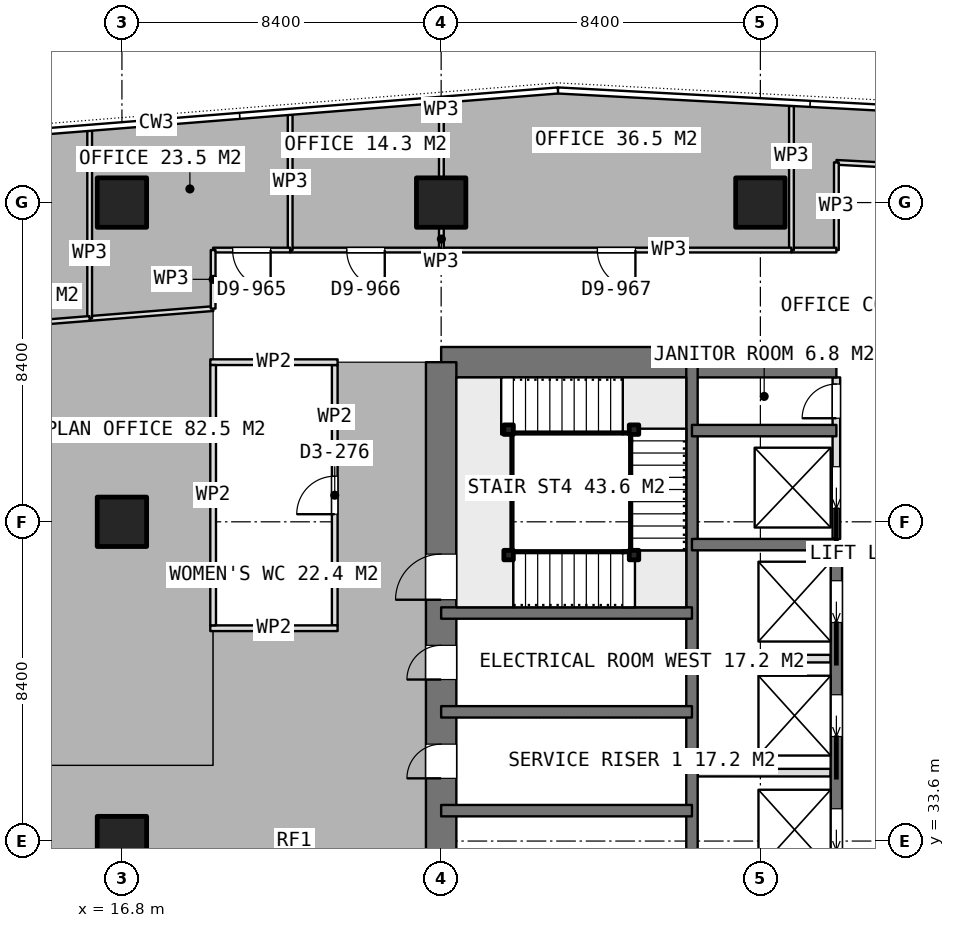
"""IFC4 building model, lengths in metres.
Left out: names, types, materials, properties, quantities, classifications, styles, units other than length and angle.
Written with IfcOpenShell. Run it as: python <this file> out.ifc"""

import sys

from ifc_helpers import new_model, si_unit, direction, frame, frame_2d, origin, origin_2d, place, context, subcontext, project, spatial, rectangle, extrude, element, fill, save


model = new_model("IFC4")
c1 = context("Model", 3, precision=1e-05, world=origin(), true_north=direction((0.0, 1.0)))
c2 = subcontext(c1, "Body", "Model", "MODEL_VIEW")
j1 = project(units=[si_unit("LENGTHUNIT", "METRE"), si_unit("PLANEANGLEUNIT", "RADIAN")], contexts=[c1])
p1 = place(None, origin())
s1 = spatial("IfcSite", under=j1, at=p1, CompositionType="ELEMENT")
p2 = place(p1, origin())
s2 = spatial("IfcBuilding", under=s1, at=p2, CompositionType="ELEMENT")
p3 = place(p2, frame((0.0, 0.0, 257.6)))
s3 = spatial("IfcBuildingStorey", under=s2, at=p3, CompositionType="ELEMENT", Elevation=257.6)
p4 = place(p3, frame((25.2, 46.2, 0.0), z_axis=(0.0, 0.0, 1.0), x_axis=(1.0, 0.0, 0.0)))
e1 = element("IfcWall", 1, at=p4, inside=s3, PredefinedType="SHEAR", context=c2, shape_type="SweptSolid", body=[
    extrude(rectangle(XDim=10.4, YDim=0.8, at=frame_2d((5.2, 0.0))), origin(), (0.0, 0.0, 1.0), 3.75),
])
p5 = place(p3, frame((25.2, 21.0, 0.0), z_axis=(0.0, 0.0, 1.0), x_axis=(0.0, 1.0, 0.0)))
e2 = element("IfcWall", 2, at=p5, inside=s3, PredefinedType="SHEAR", context=c2, shape_type="SweptSolid", body=[
    extrude(rectangle(XDim=25.2, YDim=0.8, at=frame_2d((12.6, 0.0))), origin(), (0.0, 0.0, 1.0), 3.75),
])
p6 = place(p5, frame((7.8, 0.0, 0.0)))
e3 = element("IfcOpeningElement", 3, at=p6, cuts=e2, PredefinedType="OPENING", context=c2, shape_type="SweptSolid", body=[
    extrude(rectangle(XDim=1.2, YDim=2.1, at=frame_2d((0.6, 1.05))), frame((0.0, 0.41, 0.0), z_axis=(0.0, -1.0, 0.0), x_axis=(1.0, 0.0, 0.0)), (0.0, 0.0, 1.0), 0.82),
])
p7 = place(p5, frame((14.25, 0.0, 0.0)))
e4 = element("IfcOpeningElement", 4, at=p7, cuts=e2, PredefinedType="OPENING", context=c2, shape_type="SweptSolid", body=[
    extrude(rectangle(XDim=0.9, YDim=2.1, at=frame_2d((0.45, 1.05))), frame((0.0, 0.41, 0.0), z_axis=(0.0, -1.0, 0.0), x_axis=(1.0, 0.0, 0.0)), (0.0, 0.0, 1.0), 0.82),
])
p8 = place(p5, frame((16.85, 0.0, 0.0)))
e5 = element("IfcOpeningElement", 5, at=p8, cuts=e2, PredefinedType="OPENING", context=c2, shape_type="SweptSolid", body=[
    extrude(rectangle(XDim=0.9, YDim=2.1, at=frame_2d((0.45, 1.05))), frame((0.0, 0.41, 0.0), z_axis=(0.0, -1.0, 0.0), x_axis=(1.0, 0.0, 0.0)), (0.0, 0.0, 1.0), 0.82),
])
p9 = place(p5, frame((18.95, 0.0, 0.0)))
e6 = element("IfcOpeningElement", 6, at=p9, cuts=e2, PredefinedType="OPENING", context=c2, shape_type="SweptSolid", body=[
    extrude(rectangle(XDim=1.2, YDim=2.1, at=frame_2d((0.6, 1.05))), frame((0.0, 0.41, 0.0), z_axis=(0.0, -1.0, 0.0), x_axis=(1.0, 0.0, 0.0)), (0.0, 0.0, 1.0), 0.82),
])
p10 = place(p3, frame((31.8, 21.0, 0.0), z_axis=(0.0, 0.0, 1.0), x_axis=(0.0, 1.0, 0.0)))
e7 = element("IfcWall", 7, at=p10, inside=s3, PredefinedType="SHEAR", context=c2, shape_type="SweptSolid", body=[
    extrude(rectangle(XDim=25.2, YDim=0.3, at=frame_2d((12.6, 0.0))), origin(), (0.0, 0.0, 1.0), 3.75),
])
p11 = place(p3, frame((35.6, 23.4, 0.0), z_axis=(0.0, 0.0, 1.0), x_axis=(0.0, 1.0, 0.0)))
e8 = element("IfcWall", 8, at=p11, inside=s3, PredefinedType="SHEAR", context=c2, shape_type="SweptSolid", body=[
    extrude(rectangle(XDim=18.0, YDim=0.3, at=frame_2d((9.0, 0.0))), origin(), (0.0, 0.0, 1.0), 3.75),
])
p12 = place(p11, frame((0.95, 0.0, 0.0)))
e9 = element("IfcOpeningElement", 9, at=p12, cuts=e8, PredefinedType="OPENING", context=c2, shape_type="SweptSolid", body=[
    extrude(rectangle(XDim=1.1, YDim=2.1, at=frame_2d((0.55, 1.05))), frame((0.0, 0.16, 0.0), z_axis=(0.0, -1.0, 0.0), x_axis=(1.0, 0.0, 0.0)), (0.0, 0.0, 1.0), 0.32),
])
p13 = place(p11, frame((3.95, 0.0, 0.0)))
e10 = element("IfcOpeningElement", 10, at=p13, cuts=e8, PredefinedType="OPENING", context=c2, shape_type="SweptSolid", body=[
    extrude(rectangle(XDim=1.1, YDim=2.1, at=frame_2d((0.55, 1.05))), frame((0.0, 0.16, 0.0), z_axis=(0.0, -1.0, 0.0), x_axis=(1.0, 0.0, 0.0)), (0.0, 0.0, 1.0), 0.32),
])
p14 = place(p11, frame((6.95, 0.0, 0.0)))
e11 = element("IfcOpeningElement", 11, at=p14, cuts=e8, PredefinedType="OPENING", context=c2, shape_type="SweptSolid", body=[
    extrude(rectangle(XDim=1.1, YDim=2.1, at=frame_2d((0.55, 1.05))), frame((0.0, 0.16, 0.0), z_axis=(0.0, -1.0, 0.0), x_axis=(1.0, 0.0, 0.0)), (0.0, 0.0, 1.0), 0.32),
])
p15 = place(p11, frame((9.95, 0.0, 0.0)))
e12 = element("IfcOpeningElement", 12, at=p15, cuts=e8, PredefinedType="OPENING", context=c2, shape_type="SweptSolid", body=[
    extrude(rectangle(XDim=1.1, YDim=2.1, at=frame_2d((0.55, 1.05))), frame((0.0, 0.16, 0.0), z_axis=(0.0, -1.0, 0.0), x_axis=(1.0, 0.0, 0.0)), (0.0, 0.0, 1.0), 0.32),
])
p16 = place(p11, frame((12.95, 0.0, 0.0)))
e13 = element("IfcOpeningElement", 13, at=p16, cuts=e8, PredefinedType="OPENING", context=c2, shape_type="SweptSolid", body=[
    extrude(rectangle(XDim=1.1, YDim=2.1, at=frame_2d((0.55, 1.05))), frame((0.0, 0.16, 0.0), z_axis=(0.0, -1.0, 0.0), x_axis=(1.0, 0.0, 0.0)), (0.0, 0.0, 1.0), 0.32),
])
p17 = place(p11, frame((15.95, 0.0, 0.0)))
e14 = element("IfcOpeningElement", 14, at=p17, cuts=e8, PredefinedType="OPENING", context=c2, shape_type="SweptSolid", body=[
    extrude(rectangle(XDim=1.1, YDim=2.1, at=frame_2d((0.55, 1.05))), frame((0.0, 0.16, 0.0), z_axis=(0.0, -1.0, 0.0), x_axis=(1.0, 0.0, 0.0)), (0.0, 0.0, 1.0), 0.32),
])
for number, where, z_axis, x_axis in (
    (15, (31.8, 41.4, 0.0), (0.0, 0.0, 1.0), (1.0, 0.0, 0.0)),
    (16, (31.8, 44.4, 0.0), (0.0, 0.0, 1.0), (1.0, 0.0, 0.0)),
):
    element("IfcWall", number, at=place(p3, frame(where, z_axis=z_axis, x_axis=x_axis)), inside=s3, PredefinedType="SHEAR", context=c2, shape_type="SweptSolid", body=[
        extrude(rectangle(XDim=3.8, YDim=0.3, at=frame_2d((1.9, 0.0))), origin(), (0.0, 0.0, 1.0), 3.75),
    ])
for number, where, z_axis, x_axis in (
    (17, (25.2, 34.4, 0.0), (0.0, 0.0, 1.0), (1.0, 0.0, 0.0)),
    (18, (25.2, 37.0, 0.0), (0.0, 0.0, 1.0), (1.0, 0.0, 0.0)),
    (19, (25.2, 39.6, 0.0), (0.0, 0.0, 1.0), (1.0, 0.0, 0.0)),
):
    element("IfcWall", number, at=place(p3, frame(where, z_axis=z_axis, x_axis=x_axis)), inside=s3, PredefinedType="SHEAR", context=c2, shape_type="SweptSolid", body=[
        extrude(rectangle(XDim=6.6, YDim=0.3, at=frame_2d((3.3, 0.0))), origin(), (0.0, 0.0, 1.0), 3.75),
    ])
for number, where, z_axis, x_axis in (
    (20, (16.8, 33.6, 0.0), (0.0, 0.0, 1.0), (1.0, 0.0, 0.0)),
    (21, (16.8, 42.0, 0.0), (0.0, 0.0, 1.0), (1.0, 0.0, 0.0)),
    (22, (16.8, 50.4, 0.0), (0.0, 0.0, 1.0), (1.0, 0.0, 0.0)),
    (23, (25.2, 50.4, 0.0), (0.0, 0.0, 1.0), (1.0, 0.0, 0.0)),
    (24, (33.6, 50.4, 0.0), (0.0, 0.0, 1.0), (1.0, 0.0, 0.0)),
):
    element("IfcColumn", number, at=place(p3, frame(where, z_axis=z_axis, x_axis=x_axis)), inside=s3, PredefinedType="COLUMN", context=c2, shape_type="SweptSolid", body=[
        extrude(rectangle(XDim=1.3, YDim=1.3, at=origin_2d()), origin(), (0.0, 0.0, 1.0), 3.75),
    ])
for number, where, z_axis, x_axis in (
    (25, (31.95, 35.4, 0.0), (0.0, 0.0, 1.0), (1.0, 0.0, 0.0)),
    (26, (31.95, 38.4, 0.0), (0.0, 0.0, 1.0), (1.0, 0.0, 0.0)),
):
    element("IfcWall", number, at=place(p3, frame(where, z_axis=z_axis, x_axis=x_axis)), inside=s3, PredefinedType="PARTITIONING", context=c2, shape_type="SweptSolid", body=[
        extrude(rectangle(XDim=3.5, YDim=0.2, at=frame_2d((1.75, 0.0))), origin(), (0.0, 0.0, 1.0), 3.5),
    ])
p18 = place(p3, frame((35.6, 41.55, 0.0), z_axis=(0.0, 0.0, 1.0), x_axis=(0.0, 1.0, 0.0)))
e27 = element("IfcWall", 27, at=p18, inside=s3, PredefinedType="PARTITIONING", context=c2, shape_type="SweptSolid", body=[
    extrude(rectangle(XDim=4.25, YDim=0.2, at=frame_2d((2.125, 0.0))), origin(), (0.0, 0.0, 1.0), 3.5),
])
p19 = place(p18, frame((3.175, 0.0, 0.0)))
e28 = element("IfcOpeningElement", 28, at=p19, cuts=e27, PredefinedType="OPENING", context=c2, shape_type="SweptSolid", body=[
    extrude(rectangle(XDim=0.9, YDim=2.1, at=frame_2d((0.45, 1.05))), frame((0.0, 0.11, 0.0), z_axis=(0.0, -1.0, 0.0), x_axis=(1.0, 0.0, 0.0)), (0.0, 0.0, 1.0), 0.22),
])
p20 = place(p18, frame((0.8, 0.0, 0.0)))
e29 = element("IfcOpeningElement", 29, at=p20, cuts=e27, PredefinedType="OPENING", context=c2, shape_type="SweptSolid", body=[
    extrude(rectangle(XDim=1.1, YDim=2.1, at=frame_2d((0.55, 1.05))), frame((0.0, 0.11, 0.0), z_axis=(0.0, -1.0, 0.0), x_axis=(1.0, 0.0, 0.0)), (0.0, 0.0, 1.0), 0.22),
])
for number, where, z_axis, x_axis in (
    (30, (19.125, 39.2, 0.0), (0.0, 0.0, 1.0), (1.0, 0.0, 0.0)),
    (31, (19.125, 46.2, 0.0), (0.0, 0.0, 1.0), (1.0, 0.0, 0.0)),
):
    element("IfcWall", number, at=place(p3, frame(where, z_axis=z_axis, x_axis=x_axis)), inside=s3, PredefinedType="PARTITIONING", context=c2, shape_type="SweptSolid", body=[
        extrude(rectangle(XDim=3.35, YDim=0.15, at=frame_2d((1.675, 0.0))), origin(), (0.0, 0.0, 1.0), 3.5),
    ])
p21 = place(p3, frame((19.2, 39.275, 0.0), z_axis=(0.0, 0.0, 1.0), x_axis=(0.0, 1.0, 0.0)))
e32 = element("IfcWall", 32, at=p21, inside=s3, PredefinedType="PARTITIONING", context=c2, shape_type="SweptSolid", body=[
    extrude(rectangle(XDim=6.85, YDim=0.15, at=frame_2d((3.425, 0.0))), origin(), (0.0, 0.0, 1.0), 3.5),
])
p22 = place(p3, frame((22.4, 39.275, 0.0), z_axis=(0.0, 0.0, 1.0), x_axis=(0.0, 1.0, 0.0)))
e33 = element("IfcWall", 33, at=p22, inside=s3, PredefinedType="PARTITIONING", context=c2, shape_type="SweptSolid", body=[
    extrude(rectangle(XDim=6.85, YDim=0.15, at=frame_2d((3.425, 0.0))), origin(), (0.0, 0.0, 1.0), 3.5),
])
p23 = place(p22, frame((2.925, 0.0, 0.0)))
e34 = element("IfcOpeningElement", 34, at=p23, cuts=e33, PredefinedType="OPENING", context=c2, shape_type="SweptSolid", body=[
    extrude(rectangle(XDim=1.0, YDim=2.1, at=frame_2d((0.5, 1.05))), frame((0.0, 0.085, 0.0), z_axis=(0.0, -1.0, 0.0), x_axis=(1.0, 0.0, 0.0)), (0.0, 0.0, 1.0), 0.17),
])
p24 = place(p3, frame((40.0, 51.225, 0.0), z_axis=(0.0, 0.0, 1.0), x_axis=(-0.998601864588, 0.052861290579, 0.0)))
e35 = element("IfcWall", 35, at=p24, inside=s3, PredefinedType="PARTITIONING", context=c2, shape_type="SweptSolid", body=[
    extrude(rectangle(XDim=4.406, YDim=0.125, at=frame_2d((2.203, 0.0))), origin(), (0.0, 0.0, 1.0), 3.5),
])
p25 = place(p24, frame((1.703, 0.0, 0.0)))
e36 = element("IfcOpeningElement", 36, at=p25, cuts=e35, PredefinedType="OPENING", context=c2, shape_type="SweptSolid", body=[
    extrude(rectangle(XDim=1.0, YDim=2.1, at=frame_2d((0.5, 1.05))), frame((0.0, 0.073, 0.0), z_axis=(0.0, -1.0, 0.0), x_axis=(1.0, 0.0, 0.0)), (0.0, 0.0, 1.0), 0.145),
])
p26 = place(p3, frame((35.6, 51.458, 0.0), z_axis=(0.0, 0.0, 1.0), x_axis=(0.0, -1.0, 0.0)))
e37 = element("IfcWall", 37, at=p26, inside=s3, PredefinedType="PARTITIONING", context=c2, shape_type="SweptSolid", body=[
    extrude(rectangle(XDim=2.308, YDim=0.125, at=frame_2d((1.154, 0.0))), origin(), (0.0, 0.0, 1.0), 3.5),
])
p27 = place(p3, frame((35.6, 49.15, 0.0), z_axis=(0.0, 0.0, 1.0), x_axis=(-1.0, 0.0, 0.0)))
e38 = element("IfcWall", 38, at=p27, inside=s3, PredefinedType="PARTITIONING", context=c2, shape_type="SweptSolid", body=[
    extrude(rectangle(XDim=1.182, YDim=0.125, at=frame_2d((0.591, 0.0))), origin(), (0.0, 0.0, 1.0), 3.5),
])
p28 = place(p3, frame((34.418, 49.15, 0.0), z_axis=(0.0, 0.0, 1.0), x_axis=(0.0, 1.0, 0.0)))
e39 = element("IfcWall", 39, at=p28, inside=s3, PredefinedType="PARTITIONING", context=c2, shape_type="SweptSolid", body=[
    extrude(rectangle(XDim=3.793, YDim=0.125, at=frame_2d((1.896, 0.0))), origin(), (0.0, 0.0, 1.0), 3.5),
])
p29 = place(p3, frame((34.417, 49.15, 0.0), z_axis=(0.0, 0.0, 1.0), x_axis=(-1.0, 0.0, 0.0)))
e40 = element("IfcWall", 40, at=p29, inside=s3, PredefinedType="PARTITIONING", context=c2, shape_type="SweptSolid", body=[
    extrude(rectangle(XDim=9.211, YDim=0.125, at=frame_2d((4.605, 0.0))), origin(), (0.0, 0.0, 1.0), 3.5),
])
p30 = place(p29, frame((4.105, 0.0, 0.0)))
e41 = element("IfcOpeningElement", 41, at=p30, cuts=e40, PredefinedType="OPENING", context=c2, shape_type="SweptSolid", body=[
    extrude(rectangle(XDim=1.0, YDim=2.1, at=frame_2d((0.5, 1.05))), frame((0.0, 0.073, 0.0), z_axis=(0.0, -1.0, 0.0), x_axis=(1.0, 0.0, 0.0)), (0.0, 0.0, 1.0), 0.145),
])
p31 = place(p3, frame((25.206, 49.15, 0.0), z_axis=(0.0, 0.0, 1.0), x_axis=(0.0, 1.0, 0.0)))
e42 = element("IfcWall", 42, at=p31, inside=s3, PredefinedType="PARTITIONING", context=c2, shape_type="SweptSolid", body=[
    extrude(rectangle(XDim=0.58, YDim=0.125, at=frame_2d((0.29, 0.0))), origin(), (0.0, 0.0, 1.0), 3.5),
])
p32 = place(p3, frame((25.206, 51.07, 0.0), z_axis=(0.0, 0.0, 1.0), x_axis=(0.0, 1.0, 0.0)))
e43 = element("IfcWall", 43, at=p32, inside=s3, PredefinedType="PARTITIONING", context=c2, shape_type="SweptSolid", body=[
    extrude(rectangle(XDim=1.955, YDim=0.125, at=frame_2d((0.978, 0.0))), origin(), (0.0, 0.0, 1.0), 3.5),
])
p33 = place(p3, frame((25.205, 49.15, 0.0), z_axis=(0.0, 0.0, 1.0), x_axis=(-1.0, 0.0, 0.0)))
e44 = element("IfcWall", 44, at=p33, inside=s3, PredefinedType="PARTITIONING", context=c2, shape_type="SweptSolid", body=[
    extrude(rectangle(XDim=3.978, YDim=0.125, at=frame_2d((1.989, 0.0))), origin(), (0.0, 0.0, 1.0), 3.5),
])
p34 = place(p33, frame((1.489, 0.0, 0.0)))
e45 = element("IfcOpeningElement", 45, at=p34, cuts=e44, PredefinedType="OPENING", context=c2, shape_type="SweptSolid", body=[
    extrude(rectangle(XDim=1.0, YDim=2.1, at=frame_2d((0.5, 1.05))), frame((0.0, 0.073, 0.0), z_axis=(0.0, -1.0, 0.0), x_axis=(1.0, 0.0, 0.0)), (0.0, 0.0, 1.0), 0.145),
])
p35 = place(p3, frame((21.227, 49.15, 0.0), z_axis=(0.0, 0.0, 1.0), x_axis=(0.0, 1.0, 0.0)))
e46 = element("IfcWall", 46, at=p35, inside=s3, PredefinedType="PARTITIONING", context=c2, shape_type="SweptSolid", body=[
    extrude(rectangle(XDim=3.558, YDim=0.125, at=frame_2d((1.779, 0.0))), origin(), (0.0, 0.0, 1.0), 3.5),
])
p36 = place(p3, frame((19.2, 47.61, 0.0), z_axis=(0.0, 0.0, 1.0), x_axis=(-0.99683691537, -0.079474298708, 0.0)))
e47 = element("IfcWall", 47, at=p36, inside=s3, PredefinedType="PARTITIONING", context=c2, shape_type="SweptSolid", body=[
    extrude(rectangle(XDim=3.259, YDim=0.125, at=frame_2d((1.63, 0.0))), origin(), (0.0, 0.0, 1.0), 3.5),
])
p37 = place(p3, frame((15.951, 47.351, 0.0), z_axis=(0.0, 0.0, 1.0), x_axis=(0.0, 1.0, 0.0)))
e48 = element("IfcWall", 48, at=p37, inside=s3, PredefinedType="PARTITIONING", context=c2, shape_type="SweptSolid", body=[
    extrude(rectangle(XDim=4.936, YDim=0.125, at=frame_2d((2.468, 0.0))), origin(), (0.0, 0.0, 1.0), 3.5),
])
p38 = place(p3, frame((21.226, 49.15, 0.0), z_axis=(0.0, 0.0, 1.0), x_axis=(-1.0, 0.0, 0.0)))
e49 = element("IfcWall", 49, at=p38, inside=s3, PredefinedType="PARTITIONING", context=c2, shape_type="SweptSolid", body=[
    extrude(rectangle(XDim=2.026, YDim=0.125, at=frame_2d((1.013, 0.0))), origin(), (0.0, 0.0, 1.0), 3.5),
])
p39 = place(p38, frame((0.513, 0.0, 0.0)))
e50 = element("IfcOpeningElement", 50, at=p39, cuts=e49, PredefinedType="OPENING", context=c2, shape_type="SweptSolid", body=[
    extrude(rectangle(XDim=1.0, YDim=2.1, at=frame_2d((0.5, 1.05))), frame((0.0, 0.073, 0.0), z_axis=(0.0, -1.0, 0.0), x_axis=(1.0, 0.0, 0.0)), (0.0, 0.0, 1.0), 0.145),
])
p40 = place(p3, frame((19.2, 49.15, 0.0), z_axis=(0.0, 0.0, 1.0), x_axis=(0.0, -1.0, 0.0)))
e51 = element("IfcWall", 51, at=p40, inside=s3, PredefinedType="PARTITIONING", context=c2, shape_type="SweptSolid", body=[
    extrude(rectangle(XDim=1.54, YDim=0.125, at=frame_2d((0.77, 0.0))), origin(), (0.0, 0.0, 1.0), 3.5),
])
p41 = place(p3, frame((15.95, 47.351, 0.0), z_axis=(0.0, 0.0, 1.0), x_axis=(-0.99682463174, -0.07962822086, 0.0)))
e52 = element("IfcWall", 52, at=p41, inside=s3, PredefinedType="PARTITIONING", context=c2, shape_type="SweptSolid", body=[
    extrude(rectangle(XDim=3.317, YDim=0.125, at=frame_2d((1.659, 0.0))), origin(), (0.0, 0.0, 1.0), 3.5),
])
for number, where, z_axis, x_axis in (
    (53, (26.975, 41.125, 0.0), (0.0, 0.0, 1.0), (1.0, 0.0, 0.0)),
    (54, (30.275, 41.125, 0.0), (0.0, 0.0, 1.0), (1.0, 0.0, 0.0)),
    (55, (30.275, 44.425, 0.0), (0.0, 0.0, 1.0), (1.0, 0.0, 0.0)),
    (56, (26.975, 44.425, 0.0), (0.0, 0.0, 1.0), (1.0, 0.0, 0.0)),
):
    element("IfcColumn", number, at=place(p3, frame(where, z_axis=z_axis, x_axis=x_axis)), inside=s3, PredefinedType="COLUMN", context=c2, shape_type="SweptSolid", body=[
        extrude(rectangle(XDim=0.25, YDim=0.25, at=origin_2d()), origin(), (0.0, 0.0, 1.0), 3.75),
    ])
p42 = place(p7, origin())
e57 = element("IfcDoor", 57, at=p42, inside=s3, OperationType="SINGLE_SWING_LEFT", PredefinedType="DOOR", context=c2, shape_type="SweptSolid", body=[
    extrude(rectangle(XDim=0.9, YDim=2.1, at=frame_2d((0.45, 1.05))), frame((0.0, 0.025, 0.0), z_axis=(0.0, -1.0, 0.0), x_axis=(1.0, 0.0, 0.0)), (0.0, 0.0, 1.0), 0.05),
])
fill(e4, e57)
p43 = place(p8, origin())
e58 = element("IfcDoor", 58, at=p43, inside=s3, OperationType="SINGLE_SWING_LEFT", PredefinedType="DOOR", context=c2, shape_type="SweptSolid", body=[
    extrude(rectangle(XDim=0.9, YDim=2.1, at=frame_2d((0.45, 1.05))), frame((0.0, 0.025, 0.0), z_axis=(0.0, -1.0, 0.0), x_axis=(1.0, 0.0, 0.0)), (0.0, 0.0, 1.0), 0.05),
])
fill(e5, e58)
p44 = place(p19, origin())
e59 = element("IfcDoor", 59, at=p44, inside=s3, OperationType="SINGLE_SWING_LEFT", PredefinedType="DOOR", context=c2, shape_type="SweptSolid", body=[
    extrude(rectangle(XDim=0.9, YDim=2.1, at=frame_2d((0.45, 1.05))), frame((0.0, 0.025, 0.0), z_axis=(0.0, -1.0, 0.0), x_axis=(1.0, 0.0, 0.0)), (0.0, 0.0, 1.0), 0.05),
])
fill(e28, e59)
p45 = place(p15, origin())
e60 = element("IfcDoor", 60, at=p45, inside=s3, OperationType="SLIDING_TO_LEFT", PredefinedType="USERDEFINED", context=c2, shape_type="SweptSolid", body=[
    extrude(rectangle(XDim=1.1, YDim=2.1, at=frame_2d((0.55, 1.05))), frame((0.0, 0.025, 0.0), z_axis=(0.0, -1.0, 0.0), x_axis=(1.0, 0.0, 0.0)), (0.0, 0.0, 1.0), 0.05),
])
fill(e12, e60)
p46 = place(p16, origin())
e61 = element("IfcDoor", 61, at=p46, inside=s3, OperationType="SLIDING_TO_LEFT", PredefinedType="USERDEFINED", context=c2, shape_type="SweptSolid", body=[
    extrude(rectangle(XDim=1.1, YDim=2.1, at=frame_2d((0.55, 1.05))), frame((0.0, 0.025, 0.0), z_axis=(0.0, -1.0, 0.0), x_axis=(1.0, 0.0, 0.0)), (0.0, 0.0, 1.0), 0.05),
])
fill(e13, e61)
p47 = place(p17, origin())
e62 = element("IfcDoor", 62, at=p47, inside=s3, OperationType="SLIDING_TO_LEFT", PredefinedType="USERDEFINED", context=c2, shape_type="SweptSolid", body=[
    extrude(rectangle(XDim=1.1, YDim=2.1, at=frame_2d((0.55, 1.05))), frame((0.0, 0.025, 0.0), z_axis=(0.0, -1.0, 0.0), x_axis=(1.0, 0.0, 0.0)), (0.0, 0.0, 1.0), 0.05),
])
fill(e14, e62)
p48 = place(p20, origin())
e63 = element("IfcDoor", 63, at=p48, inside=s3, OperationType="SLIDING_TO_LEFT", PredefinedType="USERDEFINED", context=c2, shape_type="SweptSolid", body=[
    extrude(rectangle(XDim=1.1, YDim=2.1, at=frame_2d((0.55, 1.05))), frame((0.0, 0.025, 0.0), z_axis=(0.0, -1.0, 0.0), x_axis=(1.0, 0.0, 0.0)), (0.0, 0.0, 1.0), 0.05),
])
fill(e29, e63)
p49 = place(p23, origin())
e64 = element("IfcDoor", 64, at=p49, inside=s3, OperationType="SINGLE_SWING_LEFT", PredefinedType="DOOR", context=c2, shape_type="SweptSolid", body=[
    extrude(rectangle(XDim=1.0, YDim=2.1, at=frame_2d((0.5, 1.05))), frame((0.0, 0.025, 0.0), z_axis=(0.0, -1.0, 0.0), x_axis=(1.0, 0.0, 0.0)), (0.0, 0.0, 1.0), 0.05),
])
fill(e34, e64)
p50 = place(p30, origin())
e65 = element("IfcDoor", 65, at=p50, inside=s3, OperationType="SINGLE_SWING_LEFT", PredefinedType="DOOR", context=c2, shape_type="SweptSolid", body=[
    extrude(rectangle(XDim=1.0, YDim=2.1, at=frame_2d((0.5, 1.05))), frame((0.0, 0.025, 0.0), z_axis=(0.0, -1.0, 0.0), x_axis=(1.0, 0.0, 0.0)), (0.0, 0.0, 1.0), 0.05),
])
fill(e41, e65)
p51 = place(p34, origin())
e66 = element("IfcDoor", 66, at=p51, inside=s3, OperationType="SINGLE_SWING_LEFT", PredefinedType="DOOR", context=c2, shape_type="SweptSolid", body=[
    extrude(rectangle(XDim=1.0, YDim=2.1, at=frame_2d((0.5, 1.05))), frame((0.0, 0.025, 0.0), z_axis=(0.0, -1.0, 0.0), x_axis=(1.0, 0.0, 0.0)), (0.0, 0.0, 1.0), 0.05),
])
fill(e45, e66)
p52 = place(p39, origin())
e67 = element("IfcDoor", 67, at=p52, inside=s3, OperationType="SINGLE_SWING_LEFT", PredefinedType="DOOR", context=c2, shape_type="SweptSolid", body=[
    extrude(rectangle(XDim=1.0, YDim=2.1, at=frame_2d((0.5, 1.05))), frame((0.0, 0.025, 0.0), z_axis=(0.0, -1.0, 0.0), x_axis=(1.0, 0.0, 0.0)), (0.0, 0.0, 1.0), 0.05),
])
fill(e50, e67)
p53 = place(p9, origin())
e68 = element("IfcDoor", 68, at=p53, inside=s3, OperationType="SINGLE_SWING_RIGHT", PredefinedType="DOOR", context=c2, shape_type="SweptSolid", body=[
    extrude(rectangle(XDim=1.2, YDim=2.1, at=frame_2d((0.6, 1.05))), frame((0.0, 0.025, 0.0), z_axis=(0.0, -1.0, 0.0), x_axis=(1.0, 0.0, 0.0)), (0.0, 0.0, 1.0), 0.05),
])
fill(e6, e68)
save(model, sys.argv[1])
